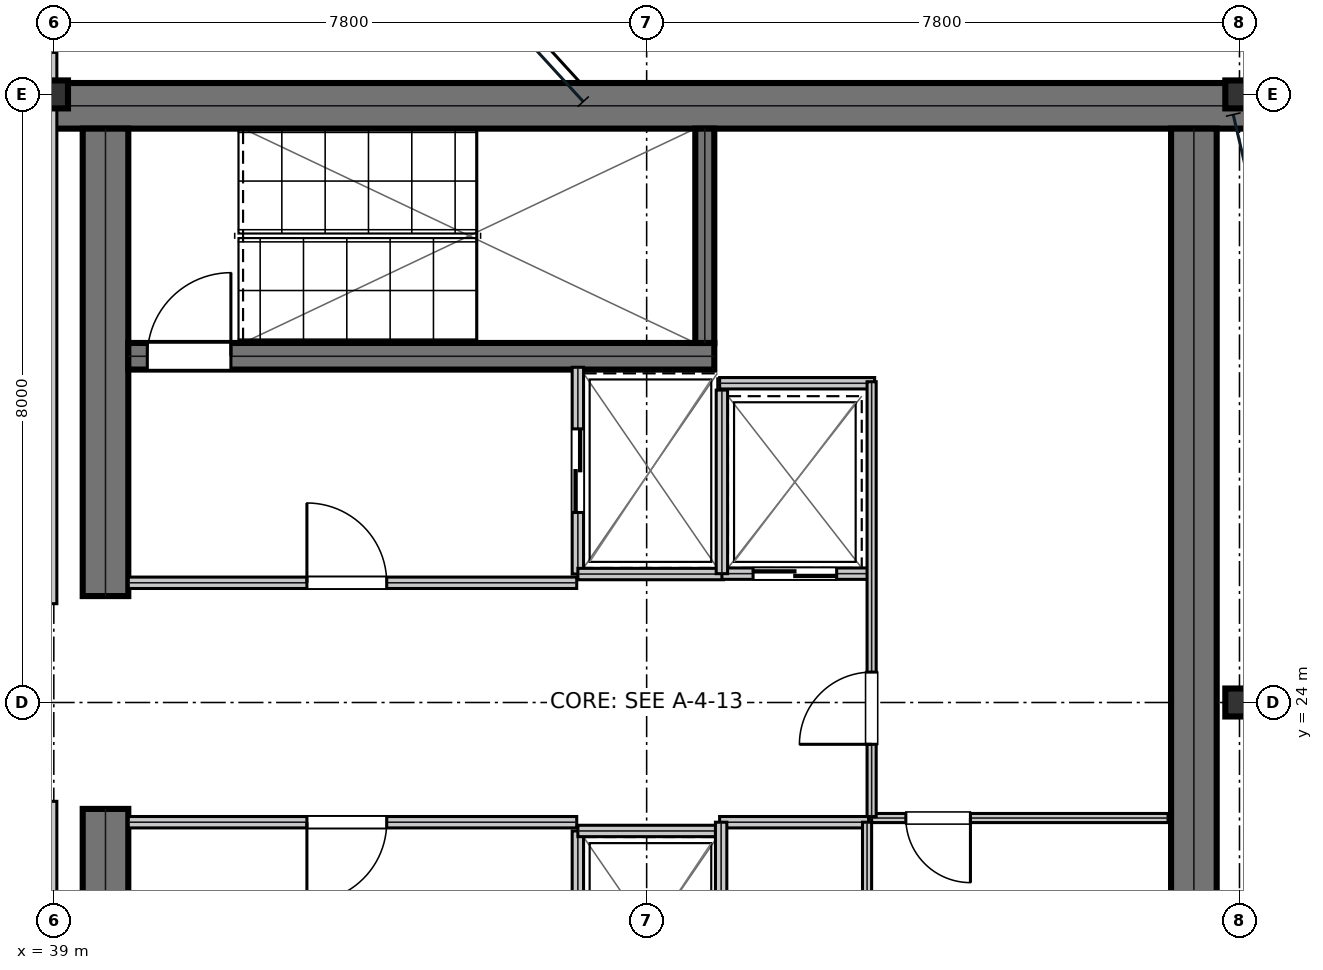
"""IFC4 building model, lengths in metres.
Left out: names, types, materials, properties, quantities, classifications, styles, units other than length and angle.
Written with IfcOpenShell. Run it as: python <this file> out.ifc"""

import sys

from ifc_helpers import new_model, si_unit, direction, frame, frame_2d, origin, origin_2d, place, context, subcontext, project, spatial, rectangle, i_section, extrude, element, fill, save


model = new_model("IFC4")
c1 = context("Model", 3, precision=1e-05, world=origin(), true_north=direction((0.0, 1.0)))
c2 = subcontext(c1, "Body", "Model", "MODEL_VIEW")
j1 = project(units=[si_unit("LENGTHUNIT", "METRE"), si_unit("PLANEANGLEUNIT", "RADIAN")], contexts=[c1])
p1 = place(None, origin())
s1 = spatial("IfcSite", under=j1, at=p1, CompositionType="ELEMENT")
p2 = place(p1, origin())
s2 = spatial("IfcBuilding", under=s1, at=p2, CompositionType="ELEMENT")
p3 = place(p2, frame((0.0, 0.0, 279.0)))
s3 = spatial("IfcBuildingStorey", under=s2, at=p3, CompositionType="ELEMENT", Elevation=279.0)
p4 = place(p3, frame((38.8, 31.85, 0.0), z_axis=(0.0, 0.0, 1.0), x_axis=(1.0, 0.0, 0.0)))
e1 = element("IfcWall", 1, at=p4, inside=s3, PredefinedType="SHEAR", context=c2, shape_type="SweptSolid", body=[
    extrude(rectangle(XDim=16.0, YDim=0.6, at=frame_2d((8.0, 0.0))), origin(), (0.0, 0.0, 1.0), 3.81),
])
for number, where, z_axis, x_axis in (
    (2, (39.68, 16.45, 0.0), (0.0, 0.0, 1.0), (0.0, 1.0, 0.0)),
    (3, (39.68, 25.4, 0.0), (0.0, 0.0, 1.0), (0.0, 1.0, 0.0)),
):
    element("IfcWall", number, at=place(p3, frame(where, z_axis=z_axis, x_axis=x_axis)), inside=s3, PredefinedType="SHEAR", context=c2, shape_type="SweptSolid", body=[
        extrude(rectangle(XDim=6.15, YDim=0.6, at=frame_2d((3.075, 0.0))), origin(), (0.0, 0.0, 1.0), 3.81),
    ])
p5 = place(p3, frame((54.0, 16.45, 0.0), z_axis=(0.0, 0.0, 1.0), x_axis=(0.0, 1.0, 0.0)))
e4 = element("IfcWall", 4, at=p5, inside=s3, PredefinedType="SHEAR", context=c2, shape_type="SweptSolid", body=[
    extrude(rectangle(XDim=15.1, YDim=0.6, at=frame_2d((7.55, 0.0))), origin(), (0.0, 0.0, 1.0), 3.81),
])
p6 = place(p3, frame((39.98, 28.555, 0.0), z_axis=(0.0, 0.0, 1.0), x_axis=(1.0, 0.0, 0.0)))
e5 = element("IfcWall", 5, at=p6, inside=s3, PredefinedType="SHEAR", context=c2, shape_type="SweptSolid", body=[
    extrude(rectangle(XDim=7.71, YDim=0.35, at=frame_2d((3.855, 0.0))), origin(), (0.0, 0.0, 1.0), 3.81),
])
p7 = place(p6, frame((0.25, 0.0, 0.0)))
e6 = element("IfcOpeningElement", 6, at=p7, cuts=e5, PredefinedType="OPENING", context=c2, shape_type="SweptSolid", body=[
    extrude(rectangle(XDim=1.1, YDim=2.15, at=frame_2d((0.55, 1.075))), frame((0.0, 0.185, 0.0), z_axis=(0.0, -1.0, 0.0), x_axis=(1.0, 0.0, 0.0)), (0.0, 0.0, 1.0), 0.37),
])
p8 = place(p3, frame((47.565, 28.73, 0.0), z_axis=(0.0, 0.0, 1.0), x_axis=(0.0, 1.0, 0.0)))
e7 = element("IfcWall", 7, at=p8, inside=s3, PredefinedType="SHEAR", context=c2, shape_type="SweptSolid", body=[
    extrude(rectangle(XDim=2.82, YDim=0.25, at=frame_2d((1.41, 0.0))), origin(), (0.0, 0.0, 1.0), 3.81),
])
for number, where, z_axis, x_axis in (
    (8, (39.0, 32.0, 0.0), (0.0, 0.0, 1.0), (1.0, 0.0, 0.0)),
    (9, (54.6, 24.0, 0.0), (0.0, 0.0, 1.0), (1.0, 0.0, 0.0)),
    (10, (54.6, 32.0, 0.0), (0.0, 0.0, 1.0), (1.0, 0.0, 0.0)),
):
    element("IfcColumn", number, at=place(p3, frame(where, z_axis=z_axis, x_axis=x_axis)), inside=s3, PredefinedType="COLUMN", context=c2, shape_type="SweptSolid", body=[
        extrude(i_section(OverallWidth=0.373, OverallDepth=0.368, WebThickness=0.015, FlangeThickness=0.024, at=origin_2d()), origin(), (0.0, 0.0, 1.0), 4.044),
    ])
p9 = place(p3, frame((39.98, 25.575, 0.0), z_axis=(0.0, 0.0, 1.0), x_axis=(1.0, 0.0, 0.0)))
e11 = element("IfcWall", 11, at=p9, inside=s3, PredefinedType="PARTITIONING", context=c2, shape_type="SweptSolid", body=[
    extrude(rectangle(XDim=5.9, YDim=0.15, at=frame_2d((2.95, 0.0))), origin(), (0.0, 0.0, 1.0), 3.81),
])
p10 = place(p9, frame((2.35, 0.0, 0.0)))
e12 = element("IfcOpeningElement", 12, at=p10, cuts=e11, PredefinedType="OPENING", context=c2, shape_type="SweptSolid", body=[
    extrude(rectangle(XDim=1.05, YDim=2.15, at=frame_2d((0.525, 1.075))), frame((0.0, 0.085, 0.0), z_axis=(0.0, -1.0, 0.0), x_axis=(1.0, 0.0, 0.0)), (0.0, 0.0, 1.0), 0.17),
])
p11 = place(p3, frame((39.98, 22.425, 0.0), z_axis=(0.0, 0.0, 1.0), x_axis=(1.0, 0.0, 0.0)))
e13 = element("IfcWall", 13, at=p11, inside=s3, PredefinedType="PARTITIONING", context=c2, shape_type="SweptSolid", body=[
    extrude(rectangle(XDim=5.9, YDim=0.15, at=frame_2d((2.95, 0.0))), origin(), (0.0, 0.0, 1.0), 3.81),
])
p12 = place(p11, frame((2.35, 0.0, 0.0)))
e14 = element("IfcOpeningElement", 14, at=p12, cuts=e13, PredefinedType="OPENING", context=c2, shape_type="SweptSolid", body=[
    extrude(rectangle(XDim=1.05, YDim=2.15, at=frame_2d((0.525, 1.075))), frame((0.0, 0.085, 0.0), z_axis=(0.0, -1.0, 0.0), x_axis=(1.0, 0.0, 0.0)), (0.0, 0.0, 1.0), 0.17),
])
p13 = place(p3, frame((45.895, 25.69, 0.0), z_axis=(0.0, 0.0, 1.0), x_axis=(0.0, 1.0, 0.0)))
e15 = element("IfcWall", 15, at=p13, inside=s3, PredefinedType="PARTITIONING", context=c2, shape_type="SweptSolid", body=[
    extrude(rectangle(XDim=2.72, YDim=0.15, at=frame_2d((1.36, 0.0))), origin(), (0.0, 0.0, 1.0), 3.81),
])
p14 = place(p13, frame((0.81, 0.0, 0.0)))
e16 = element("IfcOpeningElement", 16, at=p14, cuts=e15, PredefinedType="OPENING", context=c2, shape_type="SweptSolid", body=[
    extrude(rectangle(XDim=1.1, YDim=2.15, at=frame_2d((0.55, 1.075))), frame((0.0, 0.085, 0.0), z_axis=(0.0, -1.0, 0.0), x_axis=(1.0, 0.0, 0.0)), (0.0, 0.0, 1.0), 0.17),
])
p15 = place(p3, frame((45.895, 25.69, 0.0), z_axis=(0.0, 0.0, 1.0), x_axis=(1.0, 0.0, 0.0)))
e17 = element("IfcWall", 17, at=p15, inside=s3, PredefinedType="PARTITIONING", context=c2, shape_type="SweptSolid", body=[
    extrude(rectangle(XDim=1.915, YDim=0.15, at=frame_2d((0.958, 0.0))), origin(), (0.0, 0.0, 1.0), 3.81),
])
p16 = place(p3, frame((45.895, 19.59, 0.0), z_axis=(0.0, 0.0, 1.0), x_axis=(0.0, 1.0, 0.0)))
e18 = element("IfcWall", 18, at=p16, inside=s3, PredefinedType="PARTITIONING", context=c2, shape_type="SweptSolid", body=[
    extrude(rectangle(XDim=2.72, YDim=0.15, at=frame_2d((1.36, 0.0))), origin(), (0.0, 0.0, 1.0), 3.81),
])
p17 = place(p16, frame((0.81, 0.0, 0.0)))
e19 = element("IfcOpeningElement", 19, at=p17, cuts=e18, PredefinedType="OPENING", context=c2, shape_type="SweptSolid", body=[
    extrude(rectangle(XDim=1.1, YDim=2.15, at=frame_2d((0.55, 1.075))), frame((0.0, 0.085, 0.0), z_axis=(0.0, -1.0, 0.0), x_axis=(1.0, 0.0, 0.0)), (0.0, 0.0, 1.0), 0.17),
])
p18 = place(p3, frame((45.895, 22.31, 0.0), z_axis=(0.0, 0.0, 1.0), x_axis=(1.0, 0.0, 0.0)))
e20 = element("IfcWall", 20, at=p18, inside=s3, PredefinedType="PARTITIONING", context=c2, shape_type="SweptSolid", body=[
    extrude(rectangle(XDim=1.915, YDim=0.15, at=frame_2d((0.958, 0.0))), origin(), (0.0, 0.0, 1.0), 3.81),
])
p19 = place(p3, frame((47.79, 25.695, 0.0), z_axis=(0.0, 0.0, 1.0), x_axis=(1.0, 0.0, 0.0)))
e21 = element("IfcWall", 21, at=p19, inside=s3, PredefinedType="PARTITIONING", context=c2, shape_type="SweptSolid", body=[
    extrude(rectangle(XDim=1.92, YDim=0.15, at=frame_2d((0.96, 0.0))), origin(), (0.0, 0.0, 1.0), 3.81),
])
p20 = place(p19, frame((0.41, 0.0, 0.0)))
e22 = element("IfcOpeningElement", 22, at=p20, cuts=e21, PredefinedType="OPENING", context=c2, shape_type="SweptSolid", body=[
    extrude(rectangle(XDim=1.1, YDim=2.15, at=frame_2d((0.55, 1.075))), frame((0.0, 0.085, 0.0), z_axis=(0.0, -1.0, 0.0), x_axis=(1.0, 0.0, 0.0)), (0.0, 0.0, 1.0), 0.17),
])
p21 = place(p3, frame((47.79, 25.695, 0.0), z_axis=(0.0, 0.0, 1.0), x_axis=(0.0, 1.0, 0.0)))
e23 = element("IfcWall", 23, at=p21, inside=s3, PredefinedType="PARTITIONING", context=c2, shape_type="SweptSolid", body=[
    extrude(rectangle(XDim=2.415, YDim=0.15, at=frame_2d((1.208, 0.0))), origin(), (0.0, 0.0, 1.0), 3.81),
])
p22 = place(p3, frame((47.76, 22.425, 0.0), z_axis=(0.0, 0.0, 1.0), x_axis=(1.0, 0.0, 0.0)))
e24 = element("IfcWall", 24, at=p22, inside=s3, PredefinedType="PARTITIONING", context=c2, shape_type="SweptSolid", body=[
    extrude(rectangle(XDim=1.96, YDim=0.15, at=frame_2d((0.98, 0.0))), origin(), (0.0, 0.0, 1.0), 3.81),
])
p23 = place(p3, frame((47.78, 16.45, 0.0), z_axis=(0.0, 0.0, 1.0), x_axis=(0.0, 1.0, 0.0)))
e25 = element("IfcWall", 25, at=p23, inside=s3, PredefinedType="PARTITIONING", context=c2, shape_type="SweptSolid", body=[
    extrude(rectangle(XDim=5.975, YDim=0.15, at=frame_2d((2.988, 0.0))), origin(), (0.0, 0.0, 1.0), 3.81),
])
p24 = place(p3, frame((49.7, 16.48, 0.0), z_axis=(0.0, 0.0, 1.0), x_axis=(0.0, 1.0, 0.0)))
e26 = element("IfcWall", 26, at=p24, inside=s3, PredefinedType="PARTITIONING", context=c2, shape_type="SweptSolid", body=[
    extrude(rectangle(XDim=5.945, YDim=0.12, at=frame_2d((2.973, 0.0))), origin(), (0.0, 0.0, 1.0), 3.81),
])
p25 = place(p24, frame((1.8, 0.0, 0.0)))
e27 = element("IfcOpeningElement", 27, at=p25, cuts=e26, PredefinedType="OPENING", context=c2, shape_type="SweptSolid", body=[
    extrude(rectangle(XDim=0.85, YDim=2.15, at=frame_2d((0.425, 1.075))), frame((0.0, 0.07, 0.0), z_axis=(0.0, -1.0, 0.0), x_axis=(1.0, 0.0, 0.0)), (0.0, 0.0, 1.0), 0.14),
])
p26 = place(p24, frame((3.85, 0.0, 0.0)))
e28 = element("IfcOpeningElement", 28, at=p26, cuts=e26, PredefinedType="OPENING", context=c2, shape_type="SweptSolid", body=[
    extrude(rectangle(XDim=0.95, YDim=2.15, at=frame_2d((0.475, 1.075))), frame((0.0, 0.07, 0.0), z_axis=(0.0, -1.0, 0.0), x_axis=(1.0, 0.0, 0.0)), (0.0, 0.0, 1.0), 0.14),
])
p27 = place(p3, frame((49.76, 22.48, 0.0), z_axis=(0.0, 0.0, 1.0), x_axis=(1.0, 0.0, 0.0)))
e29 = element("IfcWall", 29, at=p27, inside=s3, PredefinedType="PARTITIONING", context=c2, shape_type="SweptSolid", body=[
    extrude(rectangle(XDim=3.9, YDim=0.12, at=frame_2d((1.95, 0.0))), origin(), (0.0, 0.0, 1.0), 3.81),
])
p28 = place(p27, frame((0.45, 0.0, 0.0)))
e30 = element("IfcOpeningElement", 30, at=p28, cuts=e29, PredefinedType="OPENING", context=c2, shape_type="SweptSolid", body=[
    extrude(rectangle(XDim=0.85, YDim=2.15, at=frame_2d((0.425, 1.075))), frame((0.0, 0.07, 0.0), z_axis=(0.0, -1.0, 0.0), x_axis=(1.0, 0.0, 0.0)), (0.0, 0.0, 1.0), 0.14),
])
p29 = place(p3, frame((47.76, 28.2, 0.0), z_axis=(0.0, 0.0, 1.0), x_axis=(1.0, 0.0, 0.0)))
e31 = element("IfcWall", 31, at=p29, inside=s3, PredefinedType="PARTITIONING", context=c2, shape_type="SweptSolid", body=[
    extrude(rectangle(XDim=2.04, YDim=0.15, at=frame_2d((1.02, 0.0))), origin(), (0.0, 0.0, 1.0), 3.81),
])
p30 = place(p3, frame((49.76, 22.5, 0.0), z_axis=(0.0, 0.0, 1.0), x_axis=(0.0, 1.0, 0.0)))
e32 = element("IfcWall", 32, at=p30, inside=s3, PredefinedType="PARTITIONING", context=c2, shape_type="SweptSolid", body=[
    extrude(rectangle(XDim=5.72, YDim=0.12, at=frame_2d((2.86, 0.0))), origin(), (0.0, 0.0, 1.0), 3.81),
])
p31 = place(p30, frame((0.95, 0.0, 0.0)))
e33 = element("IfcOpeningElement", 33, at=p31, cuts=e32, PredefinedType="OPENING", context=c2, shape_type="SweptSolid", body=[
    extrude(rectangle(XDim=0.95, YDim=2.15, at=frame_2d((0.475, 1.075))), frame((0.0, 0.07, 0.0), z_axis=(0.0, -1.0, 0.0), x_axis=(1.0, 0.0, 0.0)), (0.0, 0.0, 1.0), 0.14),
])
for number, where, z_axis, x_axis in (
    (34, (38.95, 15.447, 0.0), (0.0, 0.0, 1.0), (0.0, 1.0, 0.0)),
    (35, (38.95, 25.3, 0.0), (0.0, 0.0, 1.0), (0.0, 1.0, 0.0)),
):
    element("IfcWall", number, at=place(p3, frame(where, z_axis=z_axis, x_axis=x_axis)), inside=s3, PredefinedType="SOLIDWALL", context=c2, shape_type="SweptSolid", body=[
        extrude(rectangle(XDim=7.253, YDim=0.18, at=frame_2d((3.626, 0.0))), origin(), (0.0, 0.0, 1.0), 3.27),
    ])
p32 = place(p10, origin())
e36 = element("IfcDoor", 36, at=p32, inside=s3, OperationType="SINGLE_SWING_LEFT", PredefinedType="DOOR", context=c2, shape_type="SweptSolid", body=[
    extrude(rectangle(XDim=1.05, YDim=2.15, at=frame_2d((0.525, 1.075))), frame((0.0, 0.025, 0.0), z_axis=(0.0, -1.0, 0.0), x_axis=(1.0, 0.0, 0.0)), (0.0, 0.0, 1.0), 0.05),
])
fill(e12, e36)
p33 = place(p12, frame((1.05, 0.0, 0.0), z_axis=(0.0, 0.0, 1.0), x_axis=(-1.0, 0.0, 0.0)))
e37 = element("IfcDoor", 37, at=p33, inside=s3, OperationType="SINGLE_SWING_RIGHT", PredefinedType="DOOR", context=c2, shape_type="SweptSolid", body=[
    extrude(rectangle(XDim=1.05, YDim=2.15, at=frame_2d((0.525, 1.075))), frame((0.0, 0.025, 0.0), z_axis=(0.0, -1.0, 0.0), x_axis=(1.0, 0.0, 0.0)), (0.0, 0.0, 1.0), 0.05),
])
fill(e14, e37)
p34 = place(p14, frame((1.1, 0.0, 0.0), z_axis=(0.0, 0.0, 1.0), x_axis=(-1.0, 0.0, 0.0)))
e38 = element("IfcDoor", 38, at=p34, inside=s3, OperationType="DOUBLE_DOOR_SLIDING", PredefinedType="DOOR", context=c2, shape_type="SweptSolid", body=[
    extrude(rectangle(XDim=1.1, YDim=2.15, at=frame_2d((0.55, 1.075))), frame((0.0, 0.025, 0.0), z_axis=(0.0, -1.0, 0.0), x_axis=(1.0, 0.0, 0.0)), (0.0, 0.0, 1.0), 0.05),
])
fill(e16, e38)
p35 = place(p20, frame((1.1, 0.0, 0.0), z_axis=(0.0, 0.0, 1.0), x_axis=(-1.0, 0.0, 0.0)))
e39 = element("IfcDoor", 39, at=p35, inside=s3, OperationType="DOUBLE_DOOR_SLIDING", PredefinedType="DOOR", context=c2, shape_type="SweptSolid", body=[
    extrude(rectangle(XDim=1.1, YDim=2.15, at=frame_2d((0.55, 1.075))), frame((0.0, 0.025, 0.0), z_axis=(0.0, -1.0, 0.0), x_axis=(1.0, 0.0, 0.0)), (0.0, 0.0, 1.0), 0.05),
])
fill(e22, e39)
p36 = place(p28, frame((0.85, 0.0, 0.0), z_axis=(0.0, 0.0, 1.0), x_axis=(-1.0, 0.0, 0.0)))
e40 = element("IfcDoor", 40, at=p36, inside=s3, OperationType="SINGLE_SWING_LEFT", PredefinedType="DOOR", context=c2, shape_type="SweptSolid", body=[
    extrude(rectangle(XDim=0.85, YDim=2.15, at=frame_2d((0.425, 1.075))), frame((0.0, 0.025, 0.0), z_axis=(0.0, -1.0, 0.0), x_axis=(1.0, 0.0, 0.0)), (0.0, 0.0, 1.0), 0.05),
])
fill(e30, e40)
p37 = place(p31, origin())
e41 = element("IfcDoor", 41, at=p37, inside=s3, OperationType="SINGLE_SWING_LEFT", PredefinedType="DOOR", context=c2, shape_type="SweptSolid", body=[
    extrude(rectangle(XDim=0.95, YDim=2.15, at=frame_2d((0.475, 1.075))), frame((0.0, 0.025, 0.0), z_axis=(0.0, -1.0, 0.0), x_axis=(1.0, 0.0, 0.0)), (0.0, 0.0, 1.0), 0.05),
])
fill(e33, e41)
p38 = place(p7, origin())
e42 = element("IfcDoor", 42, at=p38, inside=s3, OperationType="SINGLE_SWING_RIGHT", PredefinedType="DOOR", context=c2, shape_type="SweptSolid", body=[
    extrude(rectangle(XDim=1.1, YDim=2.15, at=frame_2d((0.55, 1.075))), frame((0.0, 0.025, 0.0), z_axis=(0.0, -1.0, 0.0), x_axis=(1.0, 0.0, 0.0)), (0.0, 0.0, 1.0), 0.05),
])
fill(e6, e42)
save(model, sys.argv[1])
